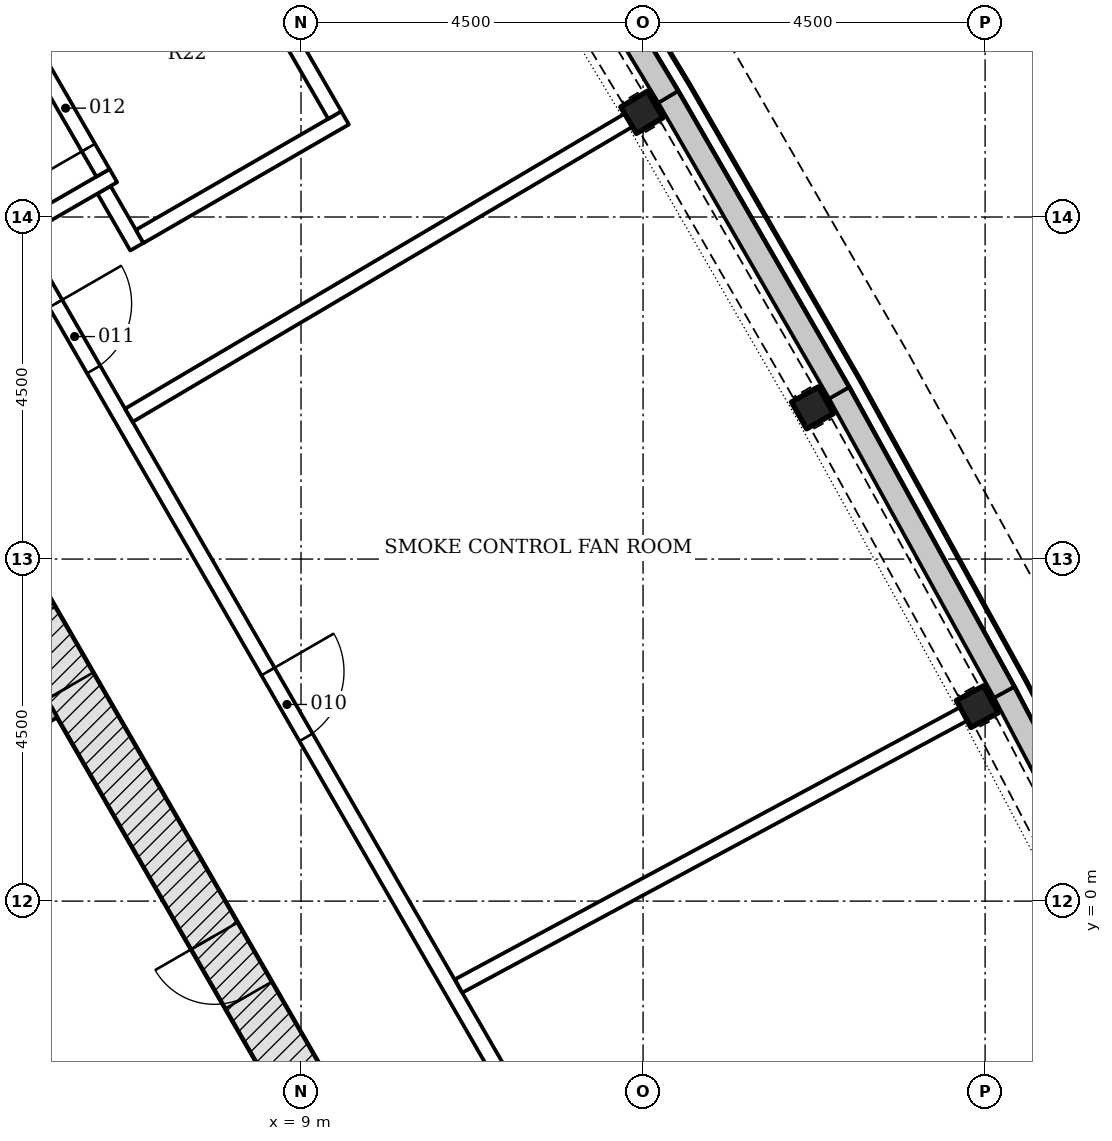
"""IFC4 building model, lengths in metres.
Left out: names, types, materials, properties, quantities, classifications, styles, units other than length and angle.
Written with IfcOpenShell. Run it as: python <this file> out.ifc"""

import sys

from ifc_helpers import new_model, si_unit, direction, frame, frame_2d, origin, origin_2d, place, context, subcontext, project, spatial, polyline, rectangle, i_section, outline, extrude, element, fill, save


model = new_model("IFC4")
c1 = context("Model", 3, precision=1e-05, world=origin(), true_north=direction((0.0, 1.0)))
c2 = subcontext(c1, "Body", "Model", "MODEL_VIEW")
j1 = project(units=[si_unit("LENGTHUNIT", "METRE"), si_unit("PLANEANGLEUNIT", "RADIAN")], contexts=[c1])
p1 = place(None, origin())
s1 = spatial("IfcSite", under=j1, at=p1, CompositionType="ELEMENT")
p2 = place(p1, origin())
s2 = spatial("IfcBuilding", under=s1, at=p2, CompositionType="ELEMENT")
p3 = place(p2, frame((0.0, 0.0, 87.0)))
s3 = spatial("IfcBuildingStorey", under=s2, at=p3, CompositionType="ELEMENT", Elevation=87.0)
p4 = place(p3, frame((10.311, -4.703, -0.3), z_axis=(0.0, 0.0, 1.0), x_axis=(-0.500001446645, 0.866024568562, 0.0)))
e1 = element("IfcWall", 1, at=p4, inside=s3, PredefinedType="SHEAR", context=c2, shape_type="SweptSolid", body=[
    extrude(rectangle(XDim=18.458, YDim=0.7, at=frame_2d((9.229, 0.0))), origin(), (0.0, 0.0, 1.0), 4.6),
])
p5 = place(p4, frame((8.7, 0.0, 0.3)))
e2 = element("IfcOpeningElement", 2, at=p5, cuts=e1, PredefinedType="OPENING", context=c2, shape_type="SweptSolid", body=[
    extrude(rectangle(XDim=1.0, YDim=2.1, at=frame_2d((0.5, 1.05))), frame((0.0, 0.36, 0.0), z_axis=(0.0, -1.0, 0.0), x_axis=(1.0, 0.0, 0.0)), (0.0, 0.0, 1.0), 0.72),
])
p6 = place(p4, frame((4.002, 0.0, 0.3)))
e3 = element("IfcOpeningElement", 3, at=p6, cuts=e1, PredefinedType="OPENING", context=c2, shape_type="SweptSolid", body=[
    extrude(rectangle(XDim=0.9, YDim=2.1, at=frame_2d((0.45, 1.05))), frame((0.0, 0.36, 0.0), z_axis=(0.0, -1.0, 0.0), x_axis=(1.0, 0.0, 0.0)), (0.0, 0.0, 1.0), 0.72),
])
p7 = place(p4, frame((14.093, 0.0, 0.3)))
e4 = element("IfcOpeningElement", 4, at=p7, cuts=e1, PredefinedType="OPENING", context=c2, shape_type="SweptSolid", body=[
    extrude(rectangle(XDim=0.9, YDim=2.1, at=frame_2d((0.45, 1.05))), frame((0.0, 0.36, 0.0), z_axis=(0.0, -1.0, 0.0), x_axis=(1.0, 0.0, 0.0)), (0.0, 0.0, 1.0), 0.72),
])
for number, where, z_axis, x_axis in (
    (5, (17.897, 2.558, -0.3), (0.0, 0.0, 1.0), (-0.474, 0.88, 0.0)),
    (6, (15.729, 6.49, -0.3), (0.0, 0.0, 1.0), (-0.491, 0.871, 0.0)),
    (7, (13.484, 10.377, -0.3), (0.0, 0.0, 1.0), (-0.508, 0.861, 0.0)),
):
    element("IfcColumn", number, at=place(p3, frame(where, z_axis=z_axis, x_axis=x_axis)), inside=s3, PredefinedType="COLUMN", context=c2, shape_type="SweptSolid", body=[
        extrude(i_section(OverallWidth=0.404, OverallDepth=0.406, WebThickness=0.027, FlangeThickness=0.044, FilletRadius=0.015, at=origin_2d()), origin(), (0.0, 0.0, 1.0), 4.6),
    ])
p8 = place(p3, origin())
e8 = element("IfcWall", 8, at=p8, inside=s3, PredefinedType="NOTDEFINED", context=c2, shape_type="SweptSolid", body=[
    extrude(outline(polyline([(20.476, -1.164), (18.381, 2.819), (18.115, 2.679), (20.21, -1.303), (20.476, -1.164)])), origin(), (0.0, 0.0, 1.0), 1.2),
])
p9 = place(p3, origin())
e9 = element("IfcWall", 9, at=p9, inside=s3, PredefinedType="NOTDEFINED", context=c2, shape_type="SweptSolid", body=[
    extrude(outline(polyline([(18.381, 2.819), (16.208, 6.76), (15.945, 6.615), (18.118, 2.674), (18.381, 2.819)])), origin(), (0.0, 0.0, 1.0), 1.2),
])
p10 = place(p3, origin())
e10 = element("IfcWall", 10, at=p10, inside=s3, PredefinedType="NOTDEFINED", context=c2, shape_type="SweptSolid", body=[
    extrude(outline(polyline([(16.208, 6.76), (13.958, 10.657), (13.698, 10.507), (15.948, 6.61), (16.208, 6.76)])), origin(), (0.0, 0.0, 1.0), 1.2),
])
p11 = place(p3, origin())
e11 = element("IfcWall", 11, at=p11, inside=s3, PredefinedType="NOTDEFINED", context=c2, shape_type="SweptSolid", body=[
    extrude(outline(polyline([(13.958, 10.657), (11.632, 14.509), (11.375, 14.354), (13.701, 10.502), (13.958, 10.657)])), origin(), (0.0, 0.0, 1.0), 1.2),
])
p12 = place(p3, frame((-4.454, -3.413, 0.0), z_axis=(0.0, 0.0, 1.0), x_axis=(0.86603043987, 0.499991277142, 0.0)))
e12 = element("IfcWall", 12, at=p12, inside=s3, PredefinedType="PARTITIONING", context=c2, shape_type="SweptSolid", body=[
    extrude(rectangle(XDim=11.792, YDim=0.15, at=frame_2d((5.896, 0.0))), origin(), (0.0, 0.0, 1.0), 4.3),
])
p13 = place(p12, frame((3.847, 0.0, 0.0)))
e13 = element("IfcOpeningElement", 13, at=p13, cuts=e12, PredefinedType="OPENING", context=c2, shape_type="SweptSolid", body=[
    extrude(rectangle(XDim=0.9, YDim=2.1, at=frame_2d((0.45, 1.05))), frame((0.0, 0.085, 0.0), z_axis=(0.0, -1.0, 0.0), x_axis=(1.0, 0.0, 0.0)), (0.0, 0.0, 1.0), 0.17),
])
p14 = place(p3, frame((6.408, 9.358, 0.0), z_axis=(0.0, 0.0, 1.0), x_axis=(0.49996696679, -0.866044474677, 0.0)))
e14 = element("IfcWall", 14, at=p14, inside=s3, PredefinedType="PARTITIONING", context=c2, shape_type="SweptSolid", body=[
    extrude(rectangle(XDim=0.864, YDim=0.2, at=frame_2d((0.432, 0.0))), origin(), (0.0, 0.0, 1.0), 4.3),
])
p15 = place(p3, frame((5.147, 8.745, 0.0), z_axis=(0.0, 0.0, 1.0), x_axis=(0.865987117328, 0.500066308224, 0.0)))
e15 = element("IfcWall", 15, at=p15, inside=s3, PredefinedType="PARTITIONING", context=c2, shape_type="SweptSolid", body=[
    extrude(rectangle(XDim=1.598, YDim=0.2, at=frame_2d((0.799, 0.0))), origin(), (0.0, 0.0, 1.0), 4.3),
])
p16 = place(p3, frame((6.395, 9.581, 0.0), z_axis=(0.0, 0.0, 1.0), x_axis=(-0.500003735859, 0.866023246874, 0.0)))
e16 = element("IfcWall", 16, at=p16, inside=s3, PredefinedType="PARTITIONING", context=c2, shape_type="SweptSolid", body=[
    extrude(rectangle(XDim=2.154, YDim=0.2, at=frame_2d((1.077, 0.0))), origin(), (0.0, 0.0, 1.0), 3.678),
])
p17 = place(p16, frame((0.383, 0.0, 0.0)))
e17 = element("IfcOpeningElement", 17, at=p17, cuts=e16, PredefinedType="OPENING", context=c2, shape_type="SweptSolid", body=[
    extrude(rectangle(XDim=1.2, YDim=2.1, at=frame_2d((0.6, 1.05))), frame((0.0, 0.11, 0.0), z_axis=(0.0, -1.0, 0.0), x_axis=(1.0, 0.0, 0.0)), (0.0, 0.0, 1.0), 0.22),
])
p18 = place(p3, frame((5.282, 8.708, 0.0), z_axis=(0.0, 0.0, 1.0), x_axis=(0.500007704848, -0.866020955343, 0.0)))
e18 = element("IfcWall", 18, at=p18, inside=s3, PredefinedType="PARTITIONING", context=c2, shape_type="SweptSolid", body=[
    extrude(rectangle(XDim=18.991, YDim=0.2, at=frame_2d((9.496, 0.0))), origin(), (0.0, 0.0, 1.0), 3.678),
])
p19 = place(p18, frame((14.783, 0.0, 0.0)))
e19 = element("IfcOpeningElement", 19, at=p19, cuts=e18, PredefinedType="OPENING", context=c2, shape_type="SweptSolid", body=[
    extrude(rectangle(XDim=1.0, YDim=2.1, at=frame_2d((0.5, 1.05))), frame((0.0, 0.11, 0.0), z_axis=(0.0, -1.0, 0.0), x_axis=(1.0, 0.0, 0.0)), (0.0, 0.0, 1.0), 0.22),
])
p20 = place(p18, frame((6.567, 0.0, 0.0)))
e20 = element("IfcOpeningElement", 20, at=p20, cuts=e18, PredefinedType="OPENING", context=c2, shape_type="SweptSolid", body=[
    extrude(rectangle(XDim=1.0, YDim=2.1, at=frame_2d((0.5, 1.05))), frame((0.0, 0.11, 0.0), z_axis=(0.0, -1.0, 0.0), x_axis=(1.0, 0.0, 0.0)), (0.0, 0.0, 1.0), 0.22),
])
p21 = place(p18, frame((0.979, 0.0, 0.0)))
e21 = element("IfcOpeningElement", 21, at=p21, cuts=e18, PredefinedType="OPENING", context=c2, shape_type="SweptSolid", body=[
    extrude(rectangle(XDim=1.0, YDim=2.1, at=frame_2d((0.5, 1.05))), frame((0.0, 0.11, 0.0), z_axis=(0.0, -1.0, 0.0), x_axis=(1.0, 0.0, 0.0)), (0.0, 0.0, 1.0), 0.22),
])
p22 = place(p3, frame((11.073, -1.117, 0.0), z_axis=(0.0, 0.0, 1.0), x_axis=(0.880412298069, 0.474209010256, 0.0)))
e22 = element("IfcWall", 22, at=p22, inside=s3, PredefinedType="PARTITIONING", context=c2, shape_type="SweptSolid", body=[
    extrude(rectangle(XDim=7.6, YDim=0.2, at=frame_2d((3.8, 0.0))), origin(), (0.0, 0.0, 1.0), 3.678),
])
p23 = place(p3, frame((6.736, 6.392, 0.0), z_axis=(0.0, 0.0, 1.0), x_axis=(0.861056110095, 0.508509955919, 0.0)))
e23 = element("IfcWall", 23, at=p23, inside=s3, PredefinedType="PARTITIONING", context=c2, shape_type="SweptSolid", body=[
    extrude(rectangle(XDim=7.688, YDim=0.2, at=frame_2d((3.844, 0.0))), origin(), (0.0, 0.0, 1.0), 3.678),
])
p24 = place(p3, frame((6.878, 8.744, 0.0), z_axis=(0.0, 0.0, 1.0), x_axis=(0.866023983177, 0.500002460556, 0.0)))
e24 = element("IfcWall", 24, at=p24, inside=s3, PredefinedType="PARTITIONING", context=c2, shape_type="SweptSolid", body=[
    extrude(rectangle(XDim=3.12, YDim=0.2, at=frame_2d((1.56, 0.0))), origin(), (0.0, 0.0, 1.0), 4.3),
])
p25 = place(p3, frame((6.566, 15.327, 0.0), z_axis=(0.0, 0.0, 1.0), x_axis=(0.499997778408, -0.866026686418, 0.0)))
e25 = element("IfcWall", 25, at=p25, inside=s3, PredefinedType="PARTITIONING", context=c2, shape_type="SweptSolid", body=[
    extrude(rectangle(XDim=5.757, YDim=0.2, at=frame_2d((2.878, 0.0))), origin(), (0.0, 0.0, 1.0), 3.678),
])
p26 = place(p5, origin())
e26 = element("IfcDoor", 26, at=p26, inside=s3, OperationType="SINGLE_SWING_LEFT", PredefinedType="DOOR", context=c2, shape_type="SweptSolid", body=[
    extrude(rectangle(XDim=1.0, YDim=2.1, at=frame_2d((0.5, 1.05))), frame((0.0, 0.075, 0.0), z_axis=(0.0, -1.0, 0.0), x_axis=(1.0, 0.0, 0.0)), (0.0, 0.0, 1.0), 0.15),
])
fill(e2, e26)
p27 = place(p6, origin())
e27 = element("IfcDoor", 27, at=p27, inside=s3, OperationType="SINGLE_SWING_RIGHT", PredefinedType="DOOR", context=c2, shape_type="SweptSolid", body=[
    extrude(rectangle(XDim=0.9, YDim=2.1, at=frame_2d((0.45, 1.05))), frame((0.0, 0.075, 0.0), z_axis=(0.0, -1.0, 0.0), x_axis=(1.0, 0.0, 0.0)), (0.0, 0.0, 1.0), 0.15),
])
fill(e3, e27)
p28 = place(p20, origin())
e28 = element("IfcDoor", 28, at=p28, inside=s3, OperationType="SINGLE_SWING_LEFT", PredefinedType="DOOR", context=c2, shape_type="SweptSolid", body=[
    extrude(rectangle(XDim=1.0, YDim=2.1, at=frame_2d((0.5, 1.05))), frame((0.0, 0.025, 0.0), z_axis=(0.0, -1.0, 0.0), x_axis=(1.0, 0.0, 0.0)), (0.0, 0.0, 1.0), 0.05),
])
fill(e20, e28)
p29 = place(p21, origin())
e29 = element("IfcDoor", 29, at=p29, inside=s3, OperationType="SINGLE_SWING_LEFT", PredefinedType="DOOR", context=c2, shape_type="SweptSolid", body=[
    extrude(rectangle(XDim=1.0, YDim=2.1, at=frame_2d((0.5, 1.05))), frame((0.0, 0.025, 0.0), z_axis=(0.0, -1.0, 0.0), x_axis=(1.0, 0.0, 0.0)), (0.0, 0.0, 1.0), 0.05),
])
fill(e21, e29)
p30 = place(p17, origin())
e30 = element("IfcDoor", 30, at=p30, inside=s3, OperationType="SINGLE_SWING_LEFT", PredefinedType="DOOR", context=c2, shape_type="SweptSolid", body=[
    extrude(rectangle(XDim=1.2, YDim=2.1, at=frame_2d((0.6, 1.05))), frame((0.0, 0.025, 0.0), z_axis=(0.0, -1.0, 0.0), x_axis=(1.0, 0.0, 0.0)), (0.0, 0.0, 1.0), 0.05),
])
fill(e17, e30)
save(model, sys.argv[1])
